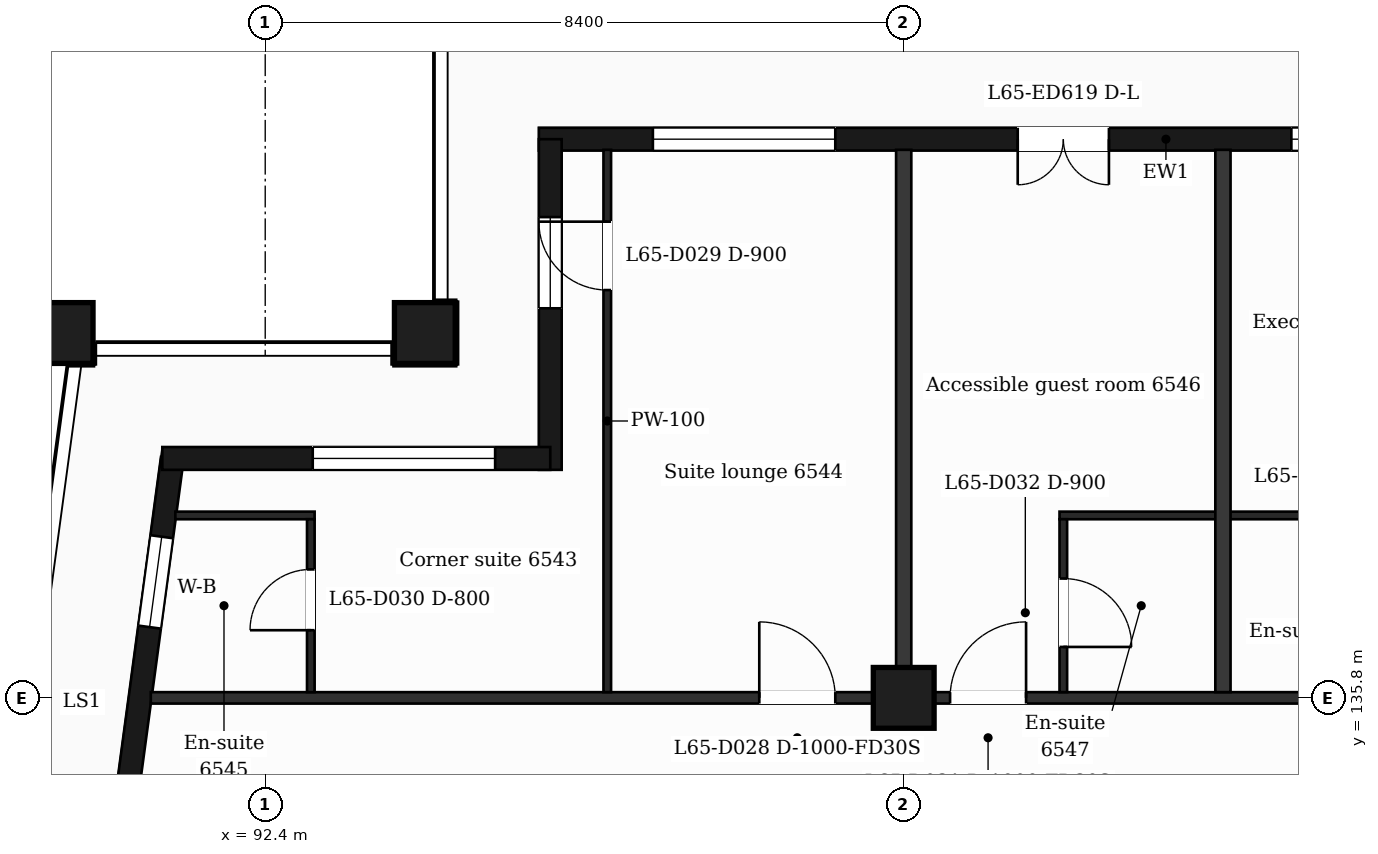
"""IFC4 building model, lengths in metres.
Left out: names, types, materials, properties, quantities, classifications, styles, units other than length and angle.
Written with IfcOpenShell. Run it as: python <this file> out.ifc"""

import sys

from ifc_helpers import new_model, si_unit, direction, frame, frame_2d, origin, origin_2d, place, context, subcontext, project, spatial, rectangle, extrude, element, fill, save


model = new_model("IFC4")
c1 = context("Model", 3, precision=1e-05, world=origin(), true_north=direction((0.0, 1.0)))
c2 = subcontext(c1, "Body", "Model", "MODEL_VIEW")
j1 = project(units=[si_unit("LENGTHUNIT", "METRE"), si_unit("PLANEANGLEUNIT", "RADIAN")], contexts=[c1])
p1 = place(None, origin())
s1 = spatial("IfcSite", under=j1, at=p1, CompositionType="ELEMENT")
p2 = place(p1, origin())
s2 = spatial("IfcBuilding", under=s1, at=p2, CompositionType="ELEMENT")
p3 = place(p2, frame((0.0, 0.0, 270.1)))
s3 = spatial("IfcBuildingStorey", under=s2, at=p3, CompositionType="ELEMENT", Elevation=270.1)
for number, where, z_axis, x_axis in (
    (1, (94.5, 140.6, 0.0), (0.0, 0.0, 1.0), (1.0, 0.0, 0.0)),
    (2, (89.735, 140.6, 0.0), (0.0, 0.0, 1.0), (1.0, 0.0, 0.0)),
    (3, (100.8, 135.8, 0.0), (0.0, 0.0, 1.0), (1.0, 0.0, 0.0)),
):
    element("IfcColumn", number, at=place(p3, frame(where, z_axis=z_axis, x_axis=x_axis)), inside=s3, PredefinedType="COLUMN", context=c2, shape_type="SweptSolid", body=[
        extrude(rectangle(XDim=0.8, YDim=0.8, at=origin_2d()), origin(), (0.0, 0.0, 1.0), 3.7),
    ])
p4 = place(p3, frame((91.177, 138.95, 0.0), z_axis=(0.0, 0.0, 1.0), x_axis=(-0.133426664613, -0.991058689065, 0.0)))
e4 = element("IfcWall", 4, at=p4, inside=s3, PredefinedType="SOLIDWALL", context=c2, shape_type="SweptSolid", body=[
    extrude(rectangle(XDim=6.609, YDim=0.3, at=frame_2d((3.305, 0.0))), origin(), (0.0, 0.0, 1.0), 3.38),
])
p5 = place(p4, frame((1.039, 0.0, 0.9)))
e5 = element("IfcOpeningElement", 5, at=p5, cuts=e4, PredefinedType="OPENING", context=c2, shape_type="SweptSolid", body=[
    extrude(rectangle(XDim=1.2, YDim=2.1, at=frame_2d((0.6, 1.05))), frame((0.0, 0.16, 0.0), z_axis=(0.0, -1.0, 0.0), x_axis=(1.0, 0.0, 0.0)), (0.0, 0.0, 1.0), 0.32),
])
p6 = place(p4, frame((4.294, 0.0, 0.0)))
e6 = element("IfcOpeningElement", 6, at=p6, cuts=e4, PredefinedType="OPENING", context=c2, shape_type="SweptSolid", body=[
    extrude(rectangle(XDim=1.2, YDim=2.4, at=frame_2d((0.6, 1.2))), frame((0.0, 0.16, 0.0), z_axis=(0.0, -1.0, 0.0), x_axis=(1.0, 0.0, 0.0)), (0.0, 0.0, 1.0), 0.32),
])
p7 = place(p3, frame((112.5, 143.15, 0.0), z_axis=(0.0, 0.0, 1.0), x_axis=(-1.0, 0.0, 0.0)))
e7 = element("IfcWall", 7, at=p7, inside=s3, PredefinedType="SOLIDWALL", context=c2, shape_type="SweptSolid", body=[
    extrude(rectangle(XDim=16.5, YDim=0.3, at=frame_2d((8.25, 0.0))), origin(), (0.0, 0.0, 1.0), 3.38),
])
p8 = place(p7, frame((0.5, 0.0, 0.9)))
e8 = element("IfcOpeningElement", 8, at=p8, cuts=e7, PredefinedType="OPENING", context=c2, shape_type="SweptSolid", body=[
    extrude(rectangle(XDim=2.4, YDim=2.1, at=frame_2d((1.2, 1.05))), frame((0.0, 0.16, 0.0), z_axis=(0.0, -1.0, 0.0), x_axis=(1.0, 0.0, 0.0)), (0.0, 0.0, 1.0), 0.32),
])
p9 = place(p7, frame((4.2, 0.0, 0.9)))
e9 = element("IfcOpeningElement", 9, at=p9, cuts=e7, PredefinedType="OPENING", context=c2, shape_type="SweptSolid", body=[
    extrude(rectangle(XDim=2.4, YDim=2.1, at=frame_2d((1.2, 1.05))), frame((0.0, 0.16, 0.0), z_axis=(0.0, -1.0, 0.0), x_axis=(1.0, 0.0, 0.0)), (0.0, 0.0, 1.0), 0.32),
])
p10 = place(p7, frame((9.0, 0.0, 0.0)))
e10 = element("IfcOpeningElement", 10, at=p10, cuts=e7, PredefinedType="OPENING", context=c2, shape_type="SweptSolid", body=[
    extrude(rectangle(XDim=1.2, YDim=2.4, at=frame_2d((0.6, 1.2))), frame((0.0, 0.16, 0.0), z_axis=(0.0, -1.0, 0.0), x_axis=(1.0, 0.0, 0.0)), (0.0, 0.0, 1.0), 0.32),
])
p11 = place(p7, frame((12.6, 0.0, 0.9)))
e11 = element("IfcOpeningElement", 11, at=p11, cuts=e7, PredefinedType="OPENING", context=c2, shape_type="SweptSolid", body=[
    extrude(rectangle(XDim=2.4, YDim=2.1, at=frame_2d((1.2, 1.05))), frame((0.0, 0.16, 0.0), z_axis=(0.0, -1.0, 0.0), x_axis=(1.0, 0.0, 0.0)), (0.0, 0.0, 1.0), 0.32),
])
p12 = place(p3, frame((96.15, 143.15, 0.0), z_axis=(0.0, 0.0, 1.0), x_axis=(0.0, -1.0, 0.0)))
e12 = element("IfcWall", 12, at=p12, inside=s3, PredefinedType="SOLIDWALL", context=c2, shape_type="SweptSolid", body=[
    extrude(rectangle(XDim=4.35, YDim=0.3, at=frame_2d((2.175, 0.0))), origin(), (0.0, 0.0, 1.0), 3.38),
])
p13 = place(p12, frame((1.025, 0.0, 0.9)))
e13 = element("IfcOpeningElement", 13, at=p13, cuts=e12, PredefinedType="OPENING", context=c2, shape_type="SweptSolid", body=[
    extrude(rectangle(XDim=1.2, YDim=2.1, at=frame_2d((0.6, 1.05))), frame((0.0, 0.16, 0.0), z_axis=(0.0, -1.0, 0.0), x_axis=(1.0, 0.0, 0.0)), (0.0, 0.0, 1.0), 0.32),
])
p14 = place(p3, frame((96.15, 138.95, 0.0), z_axis=(0.0, 0.0, 1.0), x_axis=(-1.0, 0.0, 0.0)))
e14 = element("IfcWall", 14, at=p14, inside=s3, PredefinedType="SOLIDWALL", context=c2, shape_type="SweptSolid", body=[
    extrude(rectangle(XDim=5.104, YDim=0.3, at=frame_2d((2.552, 0.0))), origin(), (0.0, 0.0, 1.0), 3.38),
])
p15 = place(p14, frame((0.725, 0.0, 0.9)))
e15 = element("IfcOpeningElement", 15, at=p15, cuts=e14, PredefinedType="OPENING", context=c2, shape_type="SweptSolid", body=[
    extrude(rectangle(XDim=2.4, YDim=2.1, at=frame_2d((1.2, 1.05))), frame((0.0, 0.16, 0.0), z_axis=(0.0, -1.0, 0.0), x_axis=(1.0, 0.0, 0.0)), (0.0, 0.0, 1.0), 0.32),
])
p16 = place(p3, frame((90.895, 135.8, 0.0), z_axis=(0.0, 0.0, 1.0), x_axis=(1.0, 0.0, 0.0)))
e16 = element("IfcWall", 16, at=p16, inside=s3, PredefinedType="PARTITIONING", context=c2, shape_type="SweptSolid", body=[
    extrude(rectangle(XDim=45.011, YDim=0.15, at=frame_2d((22.505, 0.0))), origin(), (0.0, 0.0, 1.0), 3.38),
])
p17 = place(p16, frame((8.005, 0.0, 0.0)))
e17 = element("IfcOpeningElement", 17, at=p17, cuts=e16, PredefinedType="OPENING", context=c2, shape_type="SweptSolid", body=[
    extrude(rectangle(XDim=1.0, YDim=2.1, at=frame_2d((0.5, 1.05))), frame((0.0, 0.085, 0.0), z_axis=(0.0, -1.0, 0.0), x_axis=(1.0, 0.0, 0.0)), (0.0, 0.0, 1.0), 0.17),
])
p18 = place(p16, frame((10.515, 0.0, 0.0)))
e18 = element("IfcOpeningElement", 18, at=p18, cuts=e16, PredefinedType="OPENING", context=c2, shape_type="SweptSolid", body=[
    extrude(rectangle(XDim=1.0, YDim=2.1, at=frame_2d((0.5, 1.05))), frame((0.0, 0.085, 0.0), z_axis=(0.0, -1.0, 0.0), x_axis=(1.0, 0.0, 0.0)), (0.0, 0.0, 1.0), 0.17),
])
p19 = place(p16, frame((20.156, 0.0, 0.0)))
e19 = element("IfcOpeningElement", 19, at=p19, cuts=e16, PredefinedType="OPENING", context=c2, shape_type="SweptSolid", body=[
    extrude(rectangle(XDim=1.0, YDim=2.1, at=frame_2d((0.5, 1.05))), frame((0.0, 0.085, 0.0), z_axis=(0.0, -1.0, 0.0), x_axis=(1.0, 0.0, 0.0)), (0.0, 0.0, 1.0), 0.17),
])
p20 = place(p16, frame((24.13, 0.0, 0.0)))
e20 = element("IfcOpeningElement", 20, at=p20, cuts=e16, PredefinedType="OPENING", context=c2, shape_type="SweptSolid", body=[
    extrude(rectangle(XDim=0.95, YDim=2.1, at=frame_2d((0.475, 1.05))), frame((0.0, 0.085, 0.0), z_axis=(0.0, -1.0, 0.0), x_axis=(1.0, 0.0, 0.0)), (0.0, 0.0, 1.0), 0.17),
])
p21 = place(p16, frame((29.492, 0.0, 0.0)))
e21 = element("IfcOpeningElement", 21, at=p21, cuts=e16, PredefinedType="OPENING", context=c2, shape_type="SweptSolid", body=[
    extrude(rectangle(XDim=0.95, YDim=2.1, at=frame_2d((0.475, 1.05))), frame((0.0, 0.085, 0.0), z_axis=(0.0, -1.0, 0.0), x_axis=(1.0, 0.0, 0.0)), (0.0, 0.0, 1.0), 0.17),
])
p22 = place(p16, frame((31.705, 0.0, 0.0)))
e22 = element("IfcOpeningElement", 22, at=p22, cuts=e16, PredefinedType="OPENING", context=c2, shape_type="SweptSolid", body=[
    extrude(rectangle(XDim=0.95, YDim=2.1, at=frame_2d((0.475, 1.05))), frame((0.0, 0.085, 0.0), z_axis=(0.0, -1.0, 0.0), x_axis=(1.0, 0.0, 0.0)), (0.0, 0.0, 1.0), 0.17),
])
p23 = place(p16, frame((36.18, 0.0, 0.0)))
e23 = element("IfcOpeningElement", 23, at=p23, cuts=e16, PredefinedType="OPENING", context=c2, shape_type="SweptSolid", body=[
    extrude(rectangle(XDim=1.0, YDim=2.1, at=frame_2d((0.5, 1.05))), frame((0.0, 0.085, 0.0), z_axis=(0.0, -1.0, 0.0), x_axis=(1.0, 0.0, 0.0)), (0.0, 0.0, 1.0), 0.17),
])
p24 = place(p3, frame((91.218, 138.2, 0.0), z_axis=(0.0, 0.0, 1.0), x_axis=(1.0, 0.0, 0.0)))
e24 = element("IfcWall", 24, at=p24, inside=s3, PredefinedType="PARTITIONING", context=c2, shape_type="SweptSolid", body=[
    extrude(rectangle(XDim=1.832, YDim=0.1, at=frame_2d((0.916, 0.0))), origin(), (0.0, 0.0, 1.0), 3.38),
])
p25 = place(p3, frame((102.85, 138.2, 0.0), z_axis=(0.0, 0.0, 1.0), x_axis=(1.0, 0.0, 0.0)))
e25 = element("IfcWall", 25, at=p25, inside=s3, PredefinedType="PARTITIONING", context=c2, shape_type="SweptSolid", body=[
    extrude(rectangle(XDim=4.9, YDim=0.1, at=frame_2d((2.45, 0.0))), origin(), (0.0, 0.0, 1.0), 3.38),
])
p26 = place(p25, frame((3.22, 0.0, 0.0)))
e26 = element("IfcOpeningElement", 26, at=p26, cuts=e25, PredefinedType="OPENING", context=c2, shape_type="SweptSolid", body=[
    extrude(rectangle(XDim=0.8, YDim=2.1, at=frame_2d((0.4, 1.05))), frame((0.0, 0.06, 0.0), z_axis=(0.0, -1.0, 0.0), x_axis=(1.0, 0.0, 0.0)), (0.0, 0.0, 1.0), 0.12),
])
p27 = place(p3, frame((93.0, 135.875, 0.0), z_axis=(0.0, 0.0, 1.0), x_axis=(0.0, 1.0, 0.0)))
e27 = element("IfcWall", 27, at=p27, inside=s3, PredefinedType="PARTITIONING", context=c2, shape_type="SweptSolid", body=[
    extrude(rectangle(XDim=2.275, YDim=0.1, at=frame_2d((1.137, 0.0))), origin(), (0.0, 0.0, 1.0), 3.38),
])
p28 = place(p27, frame((0.815, 0.0, 0.0)))
e28 = element("IfcOpeningElement", 28, at=p28, cuts=e27, PredefinedType="OPENING", context=c2, shape_type="SweptSolid", body=[
    extrude(rectangle(XDim=0.8, YDim=2.1, at=frame_2d((0.4, 1.05))), frame((0.0, 0.06, 0.0), z_axis=(0.0, -1.0, 0.0), x_axis=(1.0, 0.0, 0.0)), (0.0, 0.0, 1.0), 0.12),
])
p29 = place(p3, frame((96.9, 135.875, 0.0), z_axis=(0.0, 0.0, 1.0), x_axis=(0.0, 1.0, 0.0)))
e29 = element("IfcWall", 29, at=p29, inside=s3, PredefinedType="PARTITIONING", context=c2, shape_type="SweptSolid", body=[
    extrude(rectangle(XDim=7.135, YDim=0.1, at=frame_2d((3.567, 0.0))), origin(), (0.0, 0.0, 1.0), 3.38),
])
p30 = place(p29, frame((5.29, 0.0, 0.0)))
e30 = element("IfcOpeningElement", 30, at=p30, cuts=e29, PredefinedType="OPENING", context=c2, shape_type="SweptSolid", body=[
    extrude(rectangle(XDim=0.9, YDim=2.1, at=frame_2d((0.45, 1.05))), frame((0.0, 0.06, 0.0), z_axis=(0.0, -1.0, 0.0), x_axis=(1.0, 0.0, 0.0)), (0.0, 0.0, 1.0), 0.12),
])
p31 = place(p3, frame((100.8, 135.875, 0.0), z_axis=(0.0, 0.0, 1.0), x_axis=(0.0, 1.0, 0.0)))
e31 = element("IfcWall", 31, at=p31, inside=s3, PredefinedType="PARTITIONING", context=c2, shape_type="SweptSolid", body=[
    extrude(rectangle(XDim=7.135, YDim=0.2, at=frame_2d((3.567, 0.0))), origin(), (0.0, 0.0, 1.0), 3.38),
])
p32 = place(p3, frame((102.9, 135.875, 0.0), z_axis=(0.0, 0.0, 1.0), x_axis=(0.0, 1.0, 0.0)))
e32 = element("IfcWall", 32, at=p32, inside=s3, PredefinedType="PARTITIONING", context=c2, shape_type="SweptSolid", body=[
    extrude(rectangle(XDim=2.275, YDim=0.1, at=frame_2d((1.137, 0.0))), origin(), (0.0, 0.0, 1.0), 3.38),
])
p33 = place(p32, frame((0.595, 0.0, 0.0)))
e33 = element("IfcOpeningElement", 33, at=p33, cuts=e32, PredefinedType="OPENING", context=c2, shape_type="SweptSolid", body=[
    extrude(rectangle(XDim=0.9, YDim=2.1, at=frame_2d((0.45, 1.05))), frame((0.0, 0.06, 0.0), z_axis=(0.0, -1.0, 0.0), x_axis=(1.0, 0.0, 0.0)), (0.0, 0.0, 1.0), 0.12),
])
p34 = place(p3, frame((105.0, 135.875, 0.0), z_axis=(0.0, 0.0, 1.0), x_axis=(0.0, 1.0, 0.0)))
e34 = element("IfcWall", 34, at=p34, inside=s3, PredefinedType="PARTITIONING", context=c2, shape_type="SweptSolid", body=[
    extrude(rectangle(XDim=7.135, YDim=0.2, at=frame_2d((3.567, 0.0))), origin(), (0.0, 0.0, 1.0), 3.38),
])
p35 = place(p5, origin())
e35 = element("IfcWindow", 35, at=p35, inside=s3, PartitioningType="SINGLE_PANEL", PredefinedType="WINDOW", context=c2, shape_type="SweptSolid", body=[
    extrude(rectangle(XDim=1.2, YDim=2.1, at=frame_2d((0.6, 1.05))), frame((0.0, 0.03, 0.0), z_axis=(0.0, -1.0, 0.0), x_axis=(1.0, 0.0, 0.0)), (0.0, 0.0, 1.0), 0.06),
])
fill(e5, e35)
p36 = place(p9, origin())
e36 = element("IfcWindow", 36, at=p36, inside=s3, PartitioningType="SINGLE_PANEL", PredefinedType="WINDOW", context=c2, shape_type="SweptSolid", body=[
    extrude(rectangle(XDim=2.4, YDim=2.1, at=frame_2d((1.2, 1.05))), frame((0.0, 0.03, 0.0), z_axis=(0.0, -1.0, 0.0), x_axis=(1.0, 0.0, 0.0)), (0.0, 0.0, 1.0), 0.06),
])
fill(e9, e36)
p37 = place(p10, origin())
e37 = element("IfcDoor", 37, at=p37, inside=s3, OperationType="DOUBLE_DOOR_SINGLE_SWING", PredefinedType="DOOR", context=c2, shape_type="SweptSolid", body=[
    extrude(rectangle(XDim=1.2, YDim=2.4, at=frame_2d((0.6, 1.2))), frame((0.0, 0.025, 0.0), z_axis=(0.0, -1.0, 0.0), x_axis=(1.0, 0.0, 0.0)), (0.0, 0.0, 1.0), 0.05),
])
fill(e10, e37)
p38 = place(p11, origin())
e38 = element("IfcWindow", 38, at=p38, inside=s3, PartitioningType="SINGLE_PANEL", PredefinedType="WINDOW", context=c2, shape_type="SweptSolid", body=[
    extrude(rectangle(XDim=2.4, YDim=2.1, at=frame_2d((1.2, 1.05))), frame((0.0, 0.03, 0.0), z_axis=(0.0, -1.0, 0.0), x_axis=(1.0, 0.0, 0.0)), (0.0, 0.0, 1.0), 0.06),
])
fill(e11, e38)
p39 = place(p13, origin())
e39 = element("IfcWindow", 39, at=p39, inside=s3, PartitioningType="SINGLE_PANEL", PredefinedType="WINDOW", context=c2, shape_type="SweptSolid", body=[
    extrude(rectangle(XDim=1.2, YDim=2.1, at=frame_2d((0.6, 1.05))), frame((0.0, 0.03, 0.0), z_axis=(0.0, -1.0, 0.0), x_axis=(1.0, 0.0, 0.0)), (0.0, 0.0, 1.0), 0.06),
])
fill(e13, e39)
p40 = place(p15, origin())
e40 = element("IfcWindow", 40, at=p40, inside=s3, PartitioningType="SINGLE_PANEL", PredefinedType="WINDOW", context=c2, shape_type="SweptSolid", body=[
    extrude(rectangle(XDim=2.4, YDim=2.1, at=frame_2d((1.2, 1.05))), frame((0.0, 0.03, 0.0), z_axis=(0.0, -1.0, 0.0), x_axis=(1.0, 0.0, 0.0)), (0.0, 0.0, 1.0), 0.06),
])
fill(e15, e40)
p41 = place(p17, origin())
e41 = element("IfcDoor", 41, at=p41, inside=s3, OperationType="SINGLE_SWING_LEFT", PredefinedType="DOOR", context=c2, shape_type="SweptSolid", body=[
    extrude(rectangle(XDim=1.0, YDim=2.1, at=frame_2d((0.5, 1.05))), frame((0.0, 0.025, 0.0), z_axis=(0.0, -1.0, 0.0), x_axis=(1.0, 0.0, 0.0)), (0.0, 0.0, 1.0), 0.05),
])
fill(e17, e41)
p42 = place(p30, origin())
e42 = element("IfcDoor", 42, at=p42, inside=s3, OperationType="SINGLE_SWING_RIGHT", PredefinedType="DOOR", context=c2, shape_type="SweptSolid", body=[
    extrude(rectangle(XDim=0.9, YDim=2.1, at=frame_2d((0.45, 1.05))), frame((0.0, 0.025, 0.0), z_axis=(0.0, -1.0, 0.0), x_axis=(1.0, 0.0, 0.0)), (0.0, 0.0, 1.0), 0.05),
])
fill(e30, e42)
p43 = place(p28, origin())
e43 = element("IfcDoor", 43, at=p43, inside=s3, OperationType="SINGLE_SWING_LEFT", PredefinedType="DOOR", context=c2, shape_type="SweptSolid", body=[
    extrude(rectangle(XDim=0.8, YDim=2.1, at=frame_2d((0.4, 1.05))), frame((0.0, 0.025, 0.0), z_axis=(0.0, -1.0, 0.0), x_axis=(1.0, 0.0, 0.0)), (0.0, 0.0, 1.0), 0.05),
])
fill(e28, e43)
p44 = place(p18, origin())
e44 = element("IfcDoor", 44, at=p44, inside=s3, OperationType="SINGLE_SWING_RIGHT", PredefinedType="DOOR", context=c2, shape_type="SweptSolid", body=[
    extrude(rectangle(XDim=1.0, YDim=2.1, at=frame_2d((0.5, 1.05))), frame((0.0, 0.025, 0.0), z_axis=(0.0, -1.0, 0.0), x_axis=(1.0, 0.0, 0.0)), (0.0, 0.0, 1.0), 0.05),
])
fill(e18, e44)
p45 = place(p33, origin())
e45 = element("IfcDoor", 45, at=p45, inside=s3, OperationType="SINGLE_SWING_LEFT", PredefinedType="DOOR", context=c2, shape_type="SweptSolid", body=[
    extrude(rectangle(XDim=0.9, YDim=2.1, at=frame_2d((0.45, 1.05))), frame((0.0, 0.025, 0.0), z_axis=(0.0, -1.0, 0.0), x_axis=(1.0, 0.0, 0.0)), (0.0, 0.0, 1.0), 0.05),
])
fill(e33, e45)
save(model, sys.argv[1])
